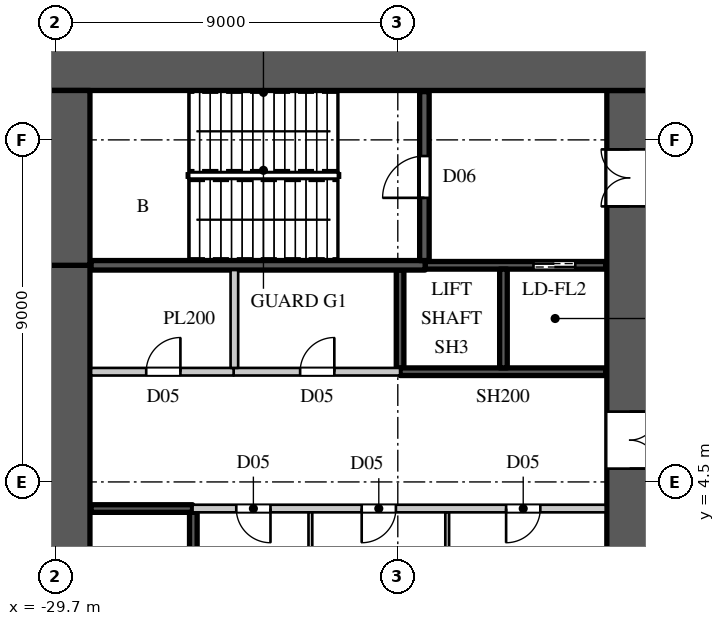
"""IFC4 building model, lengths in metres.
Left out: names, types, materials, properties, quantities, classifications, styles, units other than length and angle.
Written with IfcOpenShell. Run it as: python <this file> out.ifc"""

import sys

from ifc_helpers import new_model, si_unit, direction, frame, frame_2d, origin, place, context, subcontext, project, spatial, rectangle, extrude, element, fill, save


model = new_model("IFC4")
c1 = context("Model", 3, precision=1e-05, world=origin(), true_north=direction((0.0, 1.0)))
c2 = subcontext(c1, "Body", "Model", "MODEL_VIEW")
j1 = project(units=[si_unit("LENGTHUNIT", "METRE"), si_unit("PLANEANGLEUNIT", "RADIAN")], contexts=[c1])
p1 = place(None, origin())
s1 = spatial("IfcSite", under=j1, at=p1, CompositionType="ELEMENT")
p2 = place(p1, origin())
s2 = spatial("IfcBuilding", under=s1, at=p2, CompositionType="ELEMENT")
p3 = place(p2, frame((0.0, 0.0, 19.0)))
s3 = spatial("IfcBuildingStorey", under=s2, at=p3, CompositionType="ELEMENT", Elevation=19.0)
p4 = place(p3, frame((-30.0, 15.4, 0.0), z_axis=(0.0, 0.0, 1.0), x_axis=(1.0, 0.0, 0.0)))
e1 = element("IfcWall", 1, at=p4, inside=s3, PredefinedType="SHEAR", context=c2, shape_type="SweptSolid", body=[
    extrude(rectangle(XDim=16.0, YDim=1.2, at=frame_2d((8.0, 0.0))), origin(), (0.0, 0.0, 1.0), 10.0),
])
p5 = place(p3, frame((-14.6, -14.8, 0.0), z_axis=(0.0, 0.0, 1.0), x_axis=(0.0, 1.0, 0.0)))
e2 = element("IfcWall", 2, at=p5, inside=s3, PredefinedType="SHEAR", context=c2, shape_type="SweptSolid", body=[
    extrude(rectangle(XDim=29.6, YDim=1.2, at=frame_2d((14.8, 0.0))), origin(), (0.0, 0.0, 1.0), 10.0),
])
p6 = place(p5, frame((1.55, 0.0, 0.0)))
e3 = element("IfcOpeningElement", 3, at=p6, cuts=e2, PredefinedType="OPENING", context=c2, shape_type="SweptSolid", body=[
    extrude(rectangle(XDim=1.5, YDim=2.4, at=frame_2d((0.75, 1.2))), frame((0.0, 0.61, 0.0), z_axis=(0.0, -1.0, 0.0), x_axis=(1.0, 0.0, 0.0)), (0.0, 0.0, 1.0), 1.22),
])
p7 = place(p5, frame((26.55, 0.0, 0.0)))
e4 = element("IfcOpeningElement", 4, at=p7, cuts=e2, PredefinedType="OPENING", context=c2, shape_type="SweptSolid", body=[
    extrude(rectangle(XDim=1.5, YDim=2.4, at=frame_2d((0.75, 1.2))), frame((0.0, 0.61, 0.0), z_axis=(0.0, -1.0, 0.0), x_axis=(1.0, 0.0, 0.0)), (0.0, 0.0, 1.0), 1.22),
])
p8 = place(p5, frame((8.45, 0.0, 0.0)))
e5 = element("IfcOpeningElement", 5, at=p8, cuts=e2, PredefinedType="OPENING", context=c2, shape_type="SweptSolid", body=[
    extrude(rectangle(XDim=1.5, YDim=2.4, at=frame_2d((0.75, 1.2))), frame((0.0, 0.61, 0.0), z_axis=(0.0, -1.0, 0.0), x_axis=(1.0, 0.0, 0.0)), (0.0, 0.0, 1.0), 1.22),
])
p9 = place(p5, frame((19.65, 0.0, 0.0)))
e6 = element("IfcOpeningElement", 6, at=p9, cuts=e2, PredefinedType="OPENING", context=c2, shape_type="SweptSolid", body=[
    extrude(rectangle(XDim=1.5, YDim=2.4, at=frame_2d((0.75, 1.2))), frame((0.0, 0.61, 0.0), z_axis=(0.0, -1.0, 0.0), x_axis=(1.0, 0.0, 0.0)), (0.0, 0.0, 1.0), 1.22),
])
p10 = place(p5, frame((14.5, 0.0, 0.0)))
e7 = element("IfcOpeningElement", 7, at=p10, cuts=e2, PredefinedType="OPENING", context=c2, shape_type="SweptSolid", body=[
    extrude(rectangle(XDim=0.6, YDim=2.0, at=frame_2d((0.3, 1.0))), frame((0.0, 0.61, 0.0), z_axis=(0.0, -1.0, 0.0), x_axis=(1.0, 0.0, 0.0)), (0.0, 0.0, 1.0), 1.22),
])
p11 = place(p3, frame((-29.4, -10.2, 0.0), z_axis=(0.0, 0.0, 1.0), x_axis=(0.0, 1.0, 0.0)))
e8 = element("IfcWall", 8, at=p11, inside=s3, PredefinedType="SHEAR", context=c2, shape_type="SweptSolid", body=[
    extrude(rectangle(XDim=20.4, YDim=1.2, at=frame_2d((10.2, 0.0))), origin(), (0.0, 0.0, 1.0), 10.0),
])
p12 = place(p3, frame((-29.4, 10.2, 0.0), z_axis=(0.0, 0.0, 1.0), x_axis=(0.0, 1.0, 0.0)))
e9 = element("IfcWall", 9, at=p12, inside=s3, PredefinedType="SHEAR", context=c2, shape_type="SweptSolid", body=[
    extrude(rectangle(XDim=4.6, YDim=1.2, at=frame_2d((2.3, 0.0))), origin(), (0.0, 0.0, 1.0), 10.0),
])
p13 = place(p3, frame((-26.1, 3.8, 0.0), z_axis=(0.0, 0.0, 1.0), x_axis=(1.0, 0.0, 0.0)))
e10 = element("IfcWall", 10, at=p13, inside=s3, PredefinedType="PARTITIONING", context=c2, shape_type="SweptSolid", body=[
    extrude(rectangle(XDim=10.87, YDim=0.2, at=frame_2d((5.435, 0.0))), origin(), (0.0, 0.0, 1.0), 9.598),
])
p14 = place(p13, frame((1.15, 0.0, 0.0)))
e11 = element("IfcOpeningElement", 11, at=p14, cuts=e10, PredefinedType="OPENING", context=c2, shape_type="SweptSolid", body=[
    extrude(rectangle(XDim=0.9, YDim=2.2, at=frame_2d((0.45, 1.1))), frame((0.0, 0.11, 0.0), z_axis=(0.0, -1.0, 0.0), x_axis=(1.0, 0.0, 0.0)), (0.0, 0.0, 1.0), 0.22),
])
p15 = place(p13, frame((4.45, 0.0, 0.0)))
e12 = element("IfcOpeningElement", 12, at=p15, cuts=e10, PredefinedType="OPENING", context=c2, shape_type="SweptSolid", body=[
    extrude(rectangle(XDim=0.9, YDim=2.2, at=frame_2d((0.45, 1.1))), frame((0.0, 0.11, 0.0), z_axis=(0.0, -1.0, 0.0), x_axis=(1.0, 0.0, 0.0)), (0.0, 0.0, 1.0), 0.22),
])
p16 = place(p13, frame((8.25, 0.0, 0.0)))
e13 = element("IfcOpeningElement", 13, at=p16, cuts=e10, PredefinedType="OPENING", context=c2, shape_type="SweptSolid", body=[
    extrude(rectangle(XDim=0.9, YDim=2.2, at=frame_2d((0.45, 1.1))), frame((0.0, 0.11, 0.0), z_axis=(0.0, -1.0, 0.0), x_axis=(1.0, 0.0, 0.0)), (0.0, 0.0, 1.0), 0.22),
])
p17 = place(p3, frame((-25.02, 7.4, 0.0), z_axis=(0.0, 0.0, 1.0), x_axis=(1.0, 0.0, 0.0)))
e14 = element("IfcWall", 14, at=p17, inside=s3, PredefinedType="PARTITIONING", context=c2, shape_type="SweptSolid", body=[
    extrude(rectangle(XDim=4.38, YDim=0.2, at=frame_2d((2.19, 0.0))), origin(), (0.0, 0.0, 1.0), 9.598),
])
p18 = place(p17, frame((1.75, 0.0, 0.0)))
e15 = element("IfcOpeningElement", 15, at=p18, cuts=e14, PredefinedType="OPENING", context=c2, shape_type="SweptSolid", body=[
    extrude(rectangle(XDim=0.9, YDim=2.2, at=frame_2d((0.45, 1.1))), frame((0.0, 0.11, 0.0), z_axis=(0.0, -1.0, 0.0), x_axis=(1.0, 0.0, 0.0)), (0.0, 0.0, 1.0), 0.22),
])
p19 = place(p3, frame((-28.77, 7.4, 0.0), z_axis=(0.0, 0.0, 1.0), x_axis=(1.0, 0.0, 0.0)))
e16 = element("IfcWall", 16, at=p19, inside=s3, PredefinedType="PARTITIONING", context=c2, shape_type="SweptSolid", body=[
    extrude(rectangle(XDim=3.75, YDim=0.2, at=frame_2d((1.875, 0.0))), origin(), (0.0, 0.0, 1.0), 9.598),
])
p20 = place(p19, frame((1.45, 0.0, 0.0)))
e17 = element("IfcOpeningElement", 17, at=p20, cuts=e16, PredefinedType="OPENING", context=c2, shape_type="SweptSolid", body=[
    extrude(rectangle(XDim=0.9, YDim=2.2, at=frame_2d((0.45, 1.1))), frame((0.0, 0.11, 0.0), z_axis=(0.0, -1.0, 0.0), x_axis=(1.0, 0.0, 0.0)), (0.0, 0.0, 1.0), 0.22),
])
p21 = place(p3, frame((-25.0, 7.5, 0.0), z_axis=(0.0, 0.0, 1.0), x_axis=(0.0, 1.0, 0.0)))
e18 = element("IfcWall", 18, at=p21, inside=s3, PredefinedType="PARTITIONING", context=c2, shape_type="SweptSolid", body=[
    extrude(rectangle(XDim=2.575, YDim=0.2, at=frame_2d((1.288, 0.0))), origin(), (0.0, 0.0, 1.0), 9.598),
])
p22 = place(p3, frame((-28.77, 3.8, 0.0), z_axis=(0.0, 0.0, 1.0), x_axis=(1.0, 0.0, 0.0)))
e19 = element("IfcWall", 19, at=p22, inside=s3, PredefinedType="SHEAR", context=c2, shape_type="SweptSolid", body=[
    extrude(rectangle(XDim=2.67, YDim=0.2, at=frame_2d((1.335, 0.0))), origin(), (0.0, 0.0, 1.0), 9.598),
])
p23 = place(p3, frame((-26.08, 1.1, 0.0), z_axis=(0.0, 0.0, 1.0), x_axis=(0.0, 1.0, 0.0)))
e20 = element("IfcWall", 20, at=p23, inside=s3, PredefinedType="SHEAR", context=c2, shape_type="SweptSolid", body=[
    extrude(rectangle(XDim=2.6, YDim=0.2, at=frame_2d((1.3, 0.0))), origin(), (0.0, 0.0, 1.0), 9.598),
])
p24 = place(p3, frame((-20.64, 7.5, 0.0), z_axis=(0.0, 0.0, 1.0), x_axis=(0.0, 1.0, 0.0)))
e21 = element("IfcWall", 21, at=p24, inside=s3, PredefinedType="SHEAR", context=c2, shape_type="SweptSolid", body=[
    extrude(rectangle(XDim=2.575, YDim=0.2, at=frame_2d((1.288, 0.0))), origin(), (0.0, 0.0, 1.0), 9.598),
])
p25 = place(p3, frame((-20.64, 7.4, 0.0), z_axis=(0.0, 0.0, 1.0), x_axis=(1.0, 0.0, 0.0)))
e22 = element("IfcWall", 22, at=p25, inside=s3, PredefinedType="SHEAR", context=c2, shape_type="SweptSolid", body=[
    extrude(rectangle(XDim=5.41, YDim=0.2, at=frame_2d((2.705, 0.0))), origin(), (0.0, 0.0, 1.0), 9.598),
])
p26 = place(p3, frame((-19.98, 10.2, 0.0), z_axis=(0.0, 0.0, 1.0), x_axis=(1.0, 0.0, 0.0)))
e23 = element("IfcWall", 23, at=p26, inside=s3, PredefinedType="SHEAR", context=c2, shape_type="SweptSolid", body=[
    extrude(rectangle(XDim=4.75, YDim=0.2, at=frame_2d((2.375, 0.0))), origin(), (0.0, 0.0, 1.0), 9.598),
])
p27 = place(p26, frame((2.85, 0.0, 0.0)))
e24 = element("IfcOpeningElement", 24, at=p27, cuts=e23, PredefinedType="OPENING", context=c2, shape_type="SweptSolid", body=[
    extrude(rectangle(XDim=1.1, YDim=2.2, at=frame_2d((0.55, 1.1))), frame((0.0, 0.11, 0.0), z_axis=(0.0, -1.0, 0.0), x_axis=(1.0, 0.0, 0.0)), (0.0, 0.0, 1.0), 0.22),
])
p28 = place(p3, frame((-17.92, 7.5, 0.0), z_axis=(0.0, 0.0, 1.0), x_axis=(0.0, 1.0, 0.0)))
e25 = element("IfcWall", 25, at=p28, inside=s3, PredefinedType="SHEAR", context=c2, shape_type="SweptSolid", body=[
    extrude(rectangle(XDim=2.6, YDim=0.2, at=frame_2d((1.3, 0.0))), origin(), (0.0, 0.0, 1.0), 10.0),
])
p29 = place(p3, frame((-28.77, 10.2, 0.0), z_axis=(0.0, 0.0, 1.0), x_axis=(1.0, 0.0, 0.0)))
e26 = element("IfcWall", 26, at=p29, inside=s3, PredefinedType="SHEAR", context=c2, shape_type="SweptSolid", body=[
    extrude(rectangle(XDim=8.79, YDim=0.25, at=frame_2d((4.395, 0.0))), origin(), (0.0, 0.0, 1.0), 9.598),
])
p30 = place(p3, frame((-20.0, 10.325, 0.0), z_axis=(0.0, 0.0, 1.0), x_axis=(0.0, 1.0, 0.0)))
e27 = element("IfcWall", 27, at=p30, inside=s3, PredefinedType="SHEAR", context=c2, shape_type="SweptSolid", body=[
    extrude(rectangle(XDim=4.445, YDim=0.25, at=frame_2d((2.223, 0.0))), origin(), (0.0, 0.0, 1.0), 9.598),
])
p31 = place(p30, frame((1.65, 0.0, 0.0)))
e28 = element("IfcOpeningElement", 28, at=p31, cuts=e27, PredefinedType="OPENING", context=c2, shape_type="SweptSolid", body=[
    extrude(rectangle(XDim=1.1, YDim=2.2, at=frame_2d((0.55, 1.1))), frame((0.0, 0.135, 0.0), z_axis=(0.0, -1.0, 0.0), x_axis=(1.0, 0.0, 0.0)), (0.0, 0.0, 1.0), 0.27),
])
for number, where, z_axis, x_axis in (
    (29, (-23.0, 1.1, 0.0), (0.0, 0.0, 1.0), (0.0, 1.0, 0.0)),
    (30, (-19.4, 1.1, 0.0), (0.0, 0.0, 1.0), (0.0, 1.0, 0.0)),
):
    element("IfcWall", number, at=place(p3, frame(where, z_axis=z_axis, x_axis=x_axis)), inside=s3, PredefinedType="PARTITIONING", context=c2, shape_type="SweptSolid", body=[
        extrude(rectangle(XDim=2.6, YDim=0.1, at=frame_2d((1.3, 0.0))), origin(), (0.0, 0.0, 1.0), 9.598),
    ])
p32 = place(p31, origin())
e31 = element("IfcDoor", 31, at=p32, inside=s3, OperationType="SINGLE_SWING_LEFT", PredefinedType="DOOR", context=c2, shape_type="SweptSolid", body=[
    extrude(rectangle(XDim=1.1, YDim=2.2, at=frame_2d((0.55, 1.1))), frame((0.0, 0.025, 0.0), z_axis=(0.0, -1.0, 0.0), x_axis=(1.0, 0.0, 0.0)), (0.0, 0.0, 1.0), 0.05),
])
fill(e28, e31)
p33 = place(p14, origin())
e32 = element("IfcDoor", 32, at=p33, inside=s3, OperationType="SINGLE_SWING_LEFT", PredefinedType="DOOR", context=c2, shape_type="SweptSolid", body=[
    extrude(rectangle(XDim=0.9, YDim=2.2, at=frame_2d((0.45, 1.1))), frame((0.0, 0.025, 0.0), z_axis=(0.0, -1.0, 0.0), x_axis=(1.0, 0.0, 0.0)), (0.0, 0.0, 1.0), 0.05),
])
fill(e11, e32)
p34 = place(p15, origin())
e33 = element("IfcDoor", 33, at=p34, inside=s3, OperationType="SINGLE_SWING_RIGHT", PredefinedType="DOOR", context=c2, shape_type="SweptSolid", body=[
    extrude(rectangle(XDim=0.9, YDim=2.2, at=frame_2d((0.45, 1.1))), frame((0.0, 0.025, 0.0), z_axis=(0.0, -1.0, 0.0), x_axis=(1.0, 0.0, 0.0)), (0.0, 0.0, 1.0), 0.05),
])
fill(e12, e33)
p35 = place(p16, origin())
e34 = element("IfcDoor", 34, at=p35, inside=s3, OperationType="SINGLE_SWING_RIGHT", PredefinedType="DOOR", context=c2, shape_type="SweptSolid", body=[
    extrude(rectangle(XDim=0.9, YDim=2.2, at=frame_2d((0.45, 1.1))), frame((0.0, 0.025, 0.0), z_axis=(0.0, -1.0, 0.0), x_axis=(1.0, 0.0, 0.0)), (0.0, 0.0, 1.0), 0.05),
])
fill(e13, e34)
p36 = place(p20, origin())
e35 = element("IfcDoor", 35, at=p36, inside=s3, OperationType="SINGLE_SWING_RIGHT", PredefinedType="DOOR", context=c2, shape_type="SweptSolid", body=[
    extrude(rectangle(XDim=0.9, YDim=2.2, at=frame_2d((0.45, 1.1))), frame((0.0, 0.025, 0.0), z_axis=(0.0, -1.0, 0.0), x_axis=(1.0, 0.0, 0.0)), (0.0, 0.0, 1.0), 0.05),
])
fill(e17, e35)
p37 = place(p18, origin())
e36 = element("IfcDoor", 36, at=p37, inside=s3, OperationType="SINGLE_SWING_RIGHT", PredefinedType="DOOR", context=c2, shape_type="SweptSolid", body=[
    extrude(rectangle(XDim=0.9, YDim=2.2, at=frame_2d((0.45, 1.1))), frame((0.0, 0.025, 0.0), z_axis=(0.0, -1.0, 0.0), x_axis=(1.0, 0.0, 0.0)), (0.0, 0.0, 1.0), 0.05),
])
fill(e15, e36)
p38 = place(p27, origin())
e37 = element("IfcDoor", 37, at=p38, inside=s3, OperationType="DOUBLE_DOOR_SLIDING", PredefinedType="DOOR", context=c2, shape_type="SweptSolid", body=[
    extrude(rectangle(XDim=1.1, YDim=2.2, at=frame_2d((0.55, 1.1))), frame((0.0, 0.025, 0.0), z_axis=(0.0, -1.0, 0.0), x_axis=(1.0, 0.0, 0.0)), (0.0, 0.0, 1.0), 0.05),
])
fill(e24, e37)
p39 = place(p7, origin())
e38 = element("IfcDoor", 38, at=p39, inside=s3, OperationType="DOUBLE_DOOR_SINGLE_SWING", PredefinedType="DOOR", context=c2, shape_type="SweptSolid", body=[
    extrude(rectangle(XDim=1.5, YDim=2.4, at=frame_2d((0.75, 1.2))), frame((0.0, 0.025, 0.0), z_axis=(0.0, -1.0, 0.0), x_axis=(1.0, 0.0, 0.0)), (0.0, 0.0, 1.0), 0.05),
])
fill(e4, e38)
p40 = place(p9, origin())
e39 = element("IfcDoor", 39, at=p40, inside=s3, OperationType="DOUBLE_DOOR_SINGLE_SWING", PredefinedType="DOOR", context=c2, shape_type="SweptSolid", body=[
    extrude(rectangle(XDim=1.5, YDim=2.4, at=frame_2d((0.75, 1.2))), frame((0.0, 0.025, 0.0), z_axis=(0.0, -1.0, 0.0), x_axis=(1.0, 0.0, 0.0)), (0.0, 0.0, 1.0), 0.05),
])
fill(e6, e39)
save(model, sys.argv[1])
